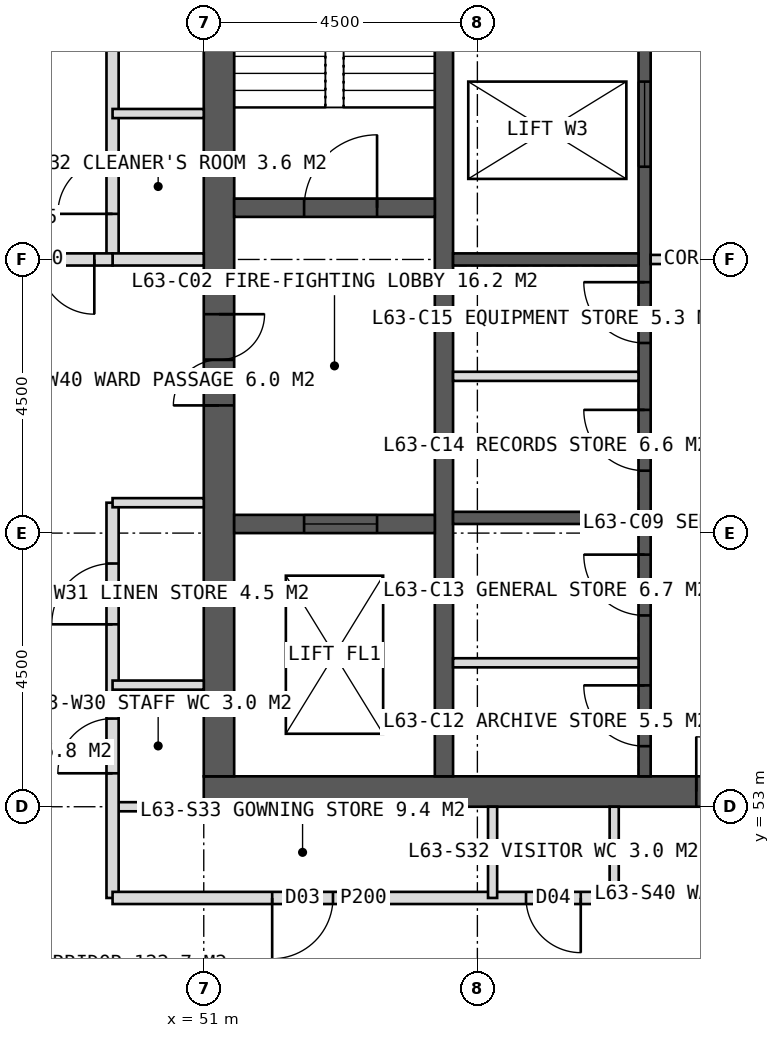
"""IFC4 building model, lengths in metres.
Left out: names, types, materials, properties, quantities, classifications, styles, units other than length and angle.
Written with IfcOpenShell. Run it as: python <this file> out.ifc"""

import sys

from ifc_helpers import new_model, si_unit, direction, frame, frame_2d, origin, place, context, subcontext, project, spatial, rectangle, extrude, element, fill, save


model = new_model("IFC4")
c1 = context("Model", 3, precision=1e-05, world=origin(), true_north=direction((0.0, 1.0)))
c2 = subcontext(c1, "Body", "Model", "MODEL_VIEW")
j1 = project(units=[si_unit("LENGTHUNIT", "METRE"), si_unit("PLANEANGLEUNIT", "RADIAN")], contexts=[c1])
p1 = place(None, origin())
s1 = spatial("IfcSite", under=j1, at=p1, CompositionType="ELEMENT")
p2 = place(p1, origin())
s2 = spatial("IfcBuilding", under=s1, at=p2, CompositionType="ELEMENT")
p3 = place(p2, frame((0.0, 0.0, 262.0)))
s3 = spatial("IfcBuildingStorey", under=s2, at=p3, CompositionType="ELEMENT", Elevation=262.0)
p4 = place(p3, frame((51.0, 53.25, 0.0), z_axis=(0.0, 0.0, 1.0), x_axis=(1.0, 0.0, 0.0)))
e1 = element("IfcWall", 1, at=p4, inside=s3, PredefinedType="SHEAR", context=c2, shape_type="SweptSolid", body=[
    extrude(rectangle(XDim=18.0, YDim=0.5, at=frame_2d((9.0, 0.0))), origin(), (0.0, 0.0, 1.0), 4.0),
])
p5 = place(p4, frame((8.1, 0.0, 0.0)))
e2 = element("IfcOpeningElement", 2, at=p5, cuts=e1, PredefinedType="OPENING", context=c2, shape_type="SweptSolid", body=[
    extrude(rectangle(XDim=1.8, YDim=2.2, at=frame_2d((0.9, 1.1))), frame((0.0, 0.26, 0.0), z_axis=(0.0, -1.0, 0.0), x_axis=(1.0, 0.0, 0.0)), (0.0, 0.0, 1.0), 0.52),
])
p6 = place(p3, frame((51.25, 53.5, 0.0), z_axis=(0.0, 0.0, 1.0), x_axis=(0.0, 1.0, 0.0)))
e3 = element("IfcWall", 3, at=p6, inside=s3, PredefinedType="SHEAR", context=c2, shape_type="SweptSolid", body=[
    extrude(rectangle(XDim=17.0, YDim=0.5, at=frame_2d((8.5, 0.0))), origin(), (0.0, 0.0, 1.0), 4.0),
])
p7 = place(p6, frame((6.1, 0.0, 0.0)))
e4 = element("IfcOpeningElement", 4, at=p7, cuts=e3, PredefinedType="OPENING", context=c2, shape_type="SweptSolid", body=[
    extrude(rectangle(XDim=1.5, YDim=2.2, at=frame_2d((0.75, 1.1))), frame((0.0, 0.26, 0.0), z_axis=(0.0, -1.0, 0.0), x_axis=(1.0, 0.0, 0.0)), (0.0, 0.0, 1.0), 0.52),
])
p8 = place(p3, frame((54.95, 53.5, 0.0), z_axis=(0.0, 0.0, 1.0), x_axis=(0.0, 1.0, 0.0)))
e5 = element("IfcWall", 5, at=p8, inside=s3, PredefinedType="SHEAR", context=c2, shape_type="SweptSolid", body=[
    extrude(rectangle(XDim=17.0, YDim=0.3, at=frame_2d((8.5, 0.0))), origin(), (0.0, 0.0, 1.0), 4.0),
])
p9 = place(p3, frame((58.25, 53.5, 0.0), z_axis=(0.0, 0.0, 1.0), x_axis=(0.0, 1.0, 0.0)))
e6 = element("IfcWall", 6, at=p9, inside=s3, PredefinedType="SHEAR", context=c2, shape_type="SweptSolid", body=[
    extrude(rectangle(XDim=17.0, YDim=0.2, at=frame_2d((8.5, 0.0))), origin(), (0.0, 0.0, 1.0), 4.0),
])
p10 = place(p9, frame((0.496, 0.0, 0.0)))
e7 = element("IfcOpeningElement", 7, at=p10, cuts=e6, PredefinedType="OPENING", context=c2, shape_type="SweptSolid", body=[
    extrude(rectangle(XDim=1.0, YDim=2.1, at=frame_2d((0.5, 1.05))), frame((0.0, 0.11, 0.0), z_axis=(0.0, -1.0, 0.0), x_axis=(1.0, 0.0, 0.0)), (0.0, 0.0, 1.0), 0.22),
])
p11 = place(p9, frame((2.646, 0.0, 0.0)))
e8 = element("IfcOpeningElement", 8, at=p11, cuts=e6, PredefinedType="OPENING", context=c2, shape_type="SweptSolid", body=[
    extrude(rectangle(XDim=1.0, YDim=2.1, at=frame_2d((0.5, 1.05))), frame((0.0, 0.11, 0.0), z_axis=(0.0, -1.0, 0.0), x_axis=(1.0, 0.0, 0.0)), (0.0, 0.0, 1.0), 0.22),
])
p12 = place(p9, frame((5.027, 0.0, 0.0)))
e9 = element("IfcOpeningElement", 9, at=p12, cuts=e6, PredefinedType="OPENING", context=c2, shape_type="SweptSolid", body=[
    extrude(rectangle(XDim=1.0, YDim=2.1, at=frame_2d((0.5, 1.05))), frame((0.0, 0.11, 0.0), z_axis=(0.0, -1.0, 0.0), x_axis=(1.0, 0.0, 0.0)), (0.0, 0.0, 1.0), 0.22),
])
p13 = place(p9, frame((7.126, 0.0, 0.0)))
e10 = element("IfcOpeningElement", 10, at=p13, cuts=e6, PredefinedType="OPENING", context=c2, shape_type="SweptSolid", body=[
    extrude(rectangle(XDim=1.0, YDim=2.1, at=frame_2d((0.5, 1.05))), frame((0.0, 0.11, 0.0), z_axis=(0.0, -1.0, 0.0), x_axis=(1.0, 0.0, 0.0)), (0.0, 0.0, 1.0), 0.22),
])
p14 = place(p9, frame((10.025, 0.0, 0.0)))
e11 = element("IfcOpeningElement", 11, at=p14, cuts=e6, PredefinedType="OPENING", context=c2, shape_type="SweptSolid", body=[
    extrude(rectangle(XDim=1.4, YDim=2.2, at=frame_2d((0.7, 1.1))), frame((0.0, 0.11, 0.0), z_axis=(0.0, -1.0, 0.0), x_axis=(1.0, 0.0, 0.0)), (0.0, 0.0, 1.0), 0.22),
])
p15 = place(p9, frame((14.325, 0.0, 0.0)))
e12 = element("IfcOpeningElement", 12, at=p15, cuts=e6, PredefinedType="OPENING", context=c2, shape_type="SweptSolid", body=[
    extrude(rectangle(XDim=1.4, YDim=2.2, at=frame_2d((0.7, 1.1))), frame((0.0, 0.11, 0.0), z_axis=(0.0, -1.0, 0.0), x_axis=(1.0, 0.0, 0.0)), (0.0, 0.0, 1.0), 0.22),
])
for number, where, z_axis, x_axis in (
    (13, (55.1, 57.75, 0.0), (0.0, 0.0, 1.0), (1.0, 0.0, 0.0)),
    (14, (55.1, 62.0, 0.0), (0.0, 0.0, 1.0), (1.0, 0.0, 0.0)),
):
    element("IfcWall", number, at=place(p3, frame(where, z_axis=z_axis, x_axis=x_axis)), inside=s3, PredefinedType="SHEAR", context=c2, shape_type="SweptSolid", body=[
        extrude(rectangle(XDim=3.05, YDim=0.2, at=frame_2d((1.525, 0.0))), origin(), (0.0, 0.0, 1.0), 4.0),
    ])
p16 = place(p3, frame((51.5, 62.85, 0.0), z_axis=(0.0, 0.0, 1.0), x_axis=(1.0, 0.0, 0.0)))
e15 = element("IfcWall", 15, at=p16, inside=s3, PredefinedType="SHEAR", context=c2, shape_type="SweptSolid", body=[
    extrude(rectangle(XDim=3.3, YDim=0.3, at=frame_2d((1.65, 0.0))), origin(), (0.0, 0.0, 1.0), 4.0),
])
p17 = place(p16, frame((1.15, 0.0, 0.0)))
e16 = element("IfcOpeningElement", 16, at=p17, cuts=e15, PredefinedType="OPENING", context=c2, shape_type="SweptSolid", body=[
    extrude(rectangle(XDim=1.2, YDim=2.1, at=frame_2d((0.6, 1.05))), frame((0.0, 0.16, 0.0), z_axis=(0.0, -1.0, 0.0), x_axis=(1.0, 0.0, 0.0)), (0.0, 0.0, 1.0), 0.32),
])
p18 = place(p3, frame((51.5, 57.65, 0.0), z_axis=(0.0, 0.0, 1.0), x_axis=(1.0, 0.0, 0.0)))
e17 = element("IfcWall", 17, at=p18, inside=s3, PredefinedType="SHEAR", context=c2, shape_type="SweptSolid", body=[
    extrude(rectangle(XDim=3.3, YDim=0.3, at=frame_2d((1.65, 0.0))), origin(), (0.0, 0.0, 1.0), 4.0),
])
p19 = place(p18, frame((1.15, 0.0, 0.0)))
e18 = element("IfcOpeningElement", 18, at=p19, cuts=e17, PredefinedType="OPENING", context=c2, shape_type="SweptSolid", body=[
    extrude(rectangle(XDim=1.2, YDim=2.2, at=frame_2d((0.6, 1.1))), frame((0.0, 0.16, 0.0), z_axis=(0.0, -1.0, 0.0), x_axis=(1.0, 0.0, 0.0)), (0.0, 0.0, 1.0), 0.32),
])
p20 = place(p3, frame((51.0, 53.0, 0.0), z_axis=(0.0, 0.0, 1.0), x_axis=(-1.0, 0.0, 0.0)))
e19 = element("IfcWall", 19, at=p20, inside=s3, PredefinedType="PARTITIONING", context=c2, shape_type="SweptSolid", body=[
    extrude(rectangle(XDim=1.5, YDim=0.15, at=frame_2d((0.75, 0.0))), origin(), (0.0, 0.0, 1.0), 3.75),
])
p21 = place(p3, frame((49.5, 51.5, 0.0), z_axis=(0.0, 0.0, 1.0), x_axis=(0.0, 1.0, 0.0)))
e20 = element("IfcWall", 20, at=p21, inside=s3, PredefinedType="PARTITIONING", context=c2, shape_type="SweptSolid", body=[
    extrude(rectangle(XDim=6.5, YDim=0.2, at=frame_2d((3.25, 0.0))), origin(), (0.0, 0.0, 1.0), 3.75),
])
p22 = place(p21, frame((2.05, 0.0, 0.0)))
e21 = element("IfcOpeningElement", 21, at=p22, cuts=e20, PredefinedType="OPENING", context=c2, shape_type="SweptSolid", body=[
    extrude(rectangle(XDim=0.9, YDim=2.1, at=frame_2d((0.45, 1.05))), frame((0.0, 0.11, 0.0), z_axis=(0.0, -1.0, 0.0), x_axis=(1.0, 0.0, 0.0)), (0.0, 0.0, 1.0), 0.22),
])
p23 = place(p21, frame((4.5, 0.0, 0.0)))
e22 = element("IfcOpeningElement", 22, at=p23, cuts=e20, PredefinedType="OPENING", context=c2, shape_type="SweptSolid", body=[
    extrude(rectangle(XDim=1.0, YDim=2.1, at=frame_2d((0.5, 1.05))), frame((0.0, 0.11, 0.0), z_axis=(0.0, -1.0, 0.0), x_axis=(1.0, 0.0, 0.0)), (0.0, 0.0, 1.0), 0.22),
])
p24 = place(p3, frame((49.5, 62.0, 0.0), z_axis=(0.0, 0.0, 1.0), x_axis=(0.0, 1.0, 0.0)))
e23 = element("IfcWall", 23, at=p24, inside=s3, PredefinedType="PARTITIONING", context=c2, shape_type="SweptSolid", body=[
    extrude(rectangle(XDim=10.5, YDim=0.2, at=frame_2d((5.25, 0.0))), origin(), (0.0, 0.0, 1.0), 3.75),
])
p25 = place(p24, frame((0.75, 0.0, 0.0)))
e24 = element("IfcOpeningElement", 24, at=p25, cuts=e23, PredefinedType="OPENING", context=c2, shape_type="SweptSolid", body=[
    extrude(rectangle(XDim=0.9, YDim=2.1, at=frame_2d((0.45, 1.05))), frame((0.0, 0.11, 0.0), z_axis=(0.0, -1.0, 0.0), x_axis=(1.0, 0.0, 0.0)), (0.0, 0.0, 1.0), 0.22),
])
p26 = place(p24, frame((5.95, 0.0, 0.0)))
e25 = element("IfcOpeningElement", 25, at=p26, cuts=e23, PredefinedType="OPENING", context=c2, shape_type="SweptSolid", body=[
    extrude(rectangle(XDim=1.0, YDim=2.1, at=frame_2d((0.5, 1.05))), frame((0.0, 0.11, 0.0), z_axis=(0.0, -1.0, 0.0), x_axis=(1.0, 0.0, 0.0)), (0.0, 0.0, 1.0), 0.22),
])
p27 = place(p3, frame((51.0, 58.0, 0.0), z_axis=(0.0, 0.0, 1.0), x_axis=(-1.0, 0.0, 0.0)))
e26 = element("IfcWall", 26, at=p27, inside=s3, PredefinedType="PARTITIONING", context=c2, shape_type="SweptSolid", body=[
    extrude(rectangle(XDim=1.5, YDim=0.15, at=frame_2d((0.75, 0.0))), origin(), (0.0, 0.0, 1.0), 3.75),
])
p28 = place(p3, frame((51.0, 62.0, 0.0), z_axis=(0.0, 0.0, 1.0), x_axis=(-1.0, 0.0, 0.0)))
e27 = element("IfcWall", 27, at=p28, inside=s3, PredefinedType="SOLIDWALL", context=c2, shape_type="SweptSolid", body=[
    extrude(rectangle(XDim=1.5, YDim=0.2, at=frame_2d((0.75, 0.0))), origin(), (0.0, 0.0, 1.0), 2.75),
])
for number, where, z_axis, x_axis in (
    (28, (51.0, 55.0, 0.0), (0.0, 0.0, 1.0), (-1.0, 0.0, 0.0)),
    (29, (51.0, 64.4, 0.0), (0.0, 0.0, 1.0), (-1.0, 0.0, 0.0)),
):
    element("IfcWall", number, at=place(p3, frame(where, z_axis=z_axis, x_axis=x_axis)), inside=s3, PredefinedType="PARTITIONING", context=c2, shape_type="SweptSolid", body=[
        extrude(rectangle(XDim=1.5, YDim=0.15, at=frame_2d((0.75, 0.0))), origin(), (0.0, 0.0, 1.0), 3.75),
    ])
p29 = place(p3, frame((57.75, 51.5, 0.0), z_axis=(0.0, 0.0, 1.0), x_axis=(-1.0, 0.0, 0.0)))
e30 = element("IfcWall", 30, at=p29, inside=s3, PredefinedType="PARTITIONING", context=c2, shape_type="SweptSolid", body=[
    extrude(rectangle(XDim=8.25, YDim=0.2, at=frame_2d((4.125, 0.0))), origin(), (0.0, 0.0, 1.0), 3.75),
])
p30 = place(p29, frame((0.55, 0.0, 0.0)))
e31 = element("IfcOpeningElement", 31, at=p30, cuts=e30, PredefinedType="OPENING", context=c2, shape_type="SweptSolid", body=[
    extrude(rectangle(XDim=0.9, YDim=2.1, at=frame_2d((0.45, 1.05))), frame((0.0, 0.11, 0.0), z_axis=(0.0, -1.0, 0.0), x_axis=(1.0, 0.0, 0.0)), (0.0, 0.0, 1.0), 0.22),
])
p31 = place(p29, frame((4.625, 0.0, 0.0)))
e32 = element("IfcOpeningElement", 32, at=p31, cuts=e30, PredefinedType="OPENING", context=c2, shape_type="SweptSolid", body=[
    extrude(rectangle(XDim=1.0, YDim=2.1, at=frame_2d((0.5, 1.05))), frame((0.0, 0.11, 0.0), z_axis=(0.0, -1.0, 0.0), x_axis=(1.0, 0.0, 0.0)), (0.0, 0.0, 1.0), 0.22),
])
p32 = place(p3, frame((57.75, 53.0, 0.0), z_axis=(0.0, 0.0, 1.0), x_axis=(0.0, -1.0, 0.0)))
e33 = element("IfcWall", 33, at=p32, inside=s3, PredefinedType="PARTITIONING", context=c2, shape_type="SweptSolid", body=[
    extrude(rectangle(XDim=1.5, YDim=0.15, at=frame_2d((0.75, 0.0))), origin(), (0.0, 0.0, 1.0), 3.75),
])
p33 = place(p3, frame((55.75, 53.0, 0.0), z_axis=(0.0, 0.0, 1.0), x_axis=(0.0, -1.0, 0.0)))
e34 = element("IfcWall", 34, at=p33, inside=s3, PredefinedType="PARTITIONING", context=c2, shape_type="SweptSolid", body=[
    extrude(rectangle(XDim=1.5, YDim=0.15, at=frame_2d((0.75, 0.0))), origin(), (0.0, 0.0, 1.0), 2.95),
])
p34 = place(p3, frame((49.5, 62.0, 0.0), z_axis=(0.0, 0.0, 1.0), x_axis=(-1.0, 0.0, 0.0)))
e35 = element("IfcWall", 35, at=p34, inside=s3, PredefinedType="SOLIDWALL", context=c2, shape_type="SweptSolid", body=[
    extrude(rectangle(XDim=2.6, YDim=0.2, at=frame_2d((1.3, 0.0))), origin(), (0.0, 0.0, 1.0), 2.75),
])
p35 = place(p34, frame((0.3, 0.0, 0.0)))
e36 = element("IfcOpeningElement", 36, at=p35, cuts=e35, PredefinedType="OPENING", context=c2, shape_type="SweptSolid", body=[
    extrude(rectangle(XDim=1.8, YDim=2.2, at=frame_2d((0.9, 1.1))), frame((0.0, 0.11, 0.0), z_axis=(0.0, -1.0, 0.0), x_axis=(1.0, 0.0, 0.0)), (0.0, 0.0, 1.0), 0.22),
])
for number, where, z_axis, x_axis in (
    (37, (55.1, 55.367, 0.0), (0.0, 0.0, 1.0), (1.0, 0.0, 0.0)),
    (38, (55.1, 60.078, 0.0), (0.0, 0.0, 1.0), (1.0, 0.0, 0.0)),
):
    element("IfcWall", number, at=place(p3, frame(where, z_axis=z_axis, x_axis=x_axis)), inside=s3, PredefinedType="PARTITIONING", context=c2, shape_type="SweptSolid", body=[
        extrude(rectangle(XDim=3.05, YDim=0.15, at=frame_2d((1.525, 0.0))), origin(), (0.0, 0.0, 1.0), 3.75),
    ])
p36 = place(p3, frame((58.35, 62.0, 0.0), z_axis=(0.0, 0.0, 1.0), x_axis=(1.0, 0.0, 0.0)))
e39 = element("IfcWall", 39, at=p36, inside=s3, PredefinedType="PARTITIONING", context=c2, shape_type="SweptSolid", body=[
    extrude(rectangle(XDim=3.3, YDim=0.15, at=frame_2d((1.65, 0.0))), origin(), (0.0, 0.0, 1.0), 3.75),
])
p37 = place(p22, origin())
e40 = element("IfcDoor", 40, at=p37, inside=s3, OperationType="SINGLE_SWING_LEFT", PredefinedType="DOOR", context=c2, shape_type="SweptSolid", body=[
    extrude(rectangle(XDim=0.9, YDim=2.1, at=frame_2d((0.45, 1.05))), frame((0.0, 0.025, 0.0), z_axis=(0.0, -1.0, 0.0), x_axis=(1.0, 0.0, 0.0)), (0.0, 0.0, 1.0), 0.05),
])
fill(e21, e40)
p38 = place(p23, origin())
e41 = element("IfcDoor", 41, at=p38, inside=s3, OperationType="SINGLE_SWING_LEFT", PredefinedType="DOOR", context=c2, shape_type="SweptSolid", body=[
    extrude(rectangle(XDim=1.0, YDim=2.1, at=frame_2d((0.5, 1.05))), frame((0.0, 0.025, 0.0), z_axis=(0.0, -1.0, 0.0), x_axis=(1.0, 0.0, 0.0)), (0.0, 0.0, 1.0), 0.05),
])
fill(e22, e41)
p39 = place(p25, origin())
e42 = element("IfcDoor", 42, at=p39, inside=s3, OperationType="SINGLE_SWING_LEFT", PredefinedType="DOOR", context=c2, shape_type="SweptSolid", body=[
    extrude(rectangle(XDim=0.9, YDim=2.1, at=frame_2d((0.45, 1.05))), frame((0.0, 0.025, 0.0), z_axis=(0.0, -1.0, 0.0), x_axis=(1.0, 0.0, 0.0)), (0.0, 0.0, 1.0), 0.05),
])
fill(e24, e42)
p40 = place(p30, origin())
e43 = element("IfcDoor", 43, at=p40, inside=s3, OperationType="SINGLE_SWING_LEFT", PredefinedType="DOOR", context=c2, shape_type="SweptSolid", body=[
    extrude(rectangle(XDim=0.9, YDim=2.1, at=frame_2d((0.45, 1.05))), frame((0.0, 0.025, 0.0), z_axis=(0.0, -1.0, 0.0), x_axis=(1.0, 0.0, 0.0)), (0.0, 0.0, 1.0), 0.05),
])
fill(e31, e43)
p41 = place(p31, origin())
e44 = element("IfcDoor", 44, at=p41, inside=s3, OperationType="SINGLE_SWING_RIGHT", PredefinedType="DOOR", context=c2, shape_type="SweptSolid", body=[
    extrude(rectangle(XDim=1.0, YDim=2.1, at=frame_2d((0.5, 1.05))), frame((0.0, 0.025, 0.0), z_axis=(0.0, -1.0, 0.0), x_axis=(1.0, 0.0, 0.0)), (0.0, 0.0, 1.0), 0.05),
])
fill(e32, e44)
p42 = place(p35, origin())
e45 = element("IfcDoor", 45, at=p42, inside=s3, OperationType="DOUBLE_DOOR_DOUBLE_SWING", PredefinedType="DOOR", context=c2, shape_type="SweptSolid", body=[
    extrude(rectangle(XDim=1.8, YDim=2.2, at=frame_2d((0.9, 1.1))), frame((0.0, 0.025, 0.0), z_axis=(0.0, -1.0, 0.0), x_axis=(1.0, 0.0, 0.0)), (0.0, 0.0, 1.0), 0.05),
])
fill(e36, e45)
p43 = place(p7, origin())
e46 = element("IfcDoor", 46, at=p43, inside=s3, OperationType="DOUBLE_DOOR_SINGLE_SWING", PredefinedType="DOOR", context=c2, shape_type="SweptSolid", body=[
    extrude(rectangle(XDim=1.5, YDim=2.2, at=frame_2d((0.75, 1.1))), frame((0.0, 0.025, 0.0), z_axis=(0.0, -1.0, 0.0), x_axis=(1.0, 0.0, 0.0)), (0.0, 0.0, 1.0), 0.05),
])
fill(e4, e46)
p44 = place(p17, origin())
e47 = element("IfcDoor", 47, at=p44, inside=s3, OperationType="SINGLE_SWING_RIGHT", PredefinedType="DOOR", context=c2, shape_type="SweptSolid", body=[
    extrude(rectangle(XDim=1.2, YDim=2.1, at=frame_2d((0.6, 1.05))), frame((0.0, 0.025, 0.0), z_axis=(0.0, -1.0, 0.0), x_axis=(1.0, 0.0, 0.0)), (0.0, 0.0, 1.0), 0.05),
])
fill(e16, e47)
p45 = place(p19, origin())
e48 = element("IfcDoor", 48, at=p45, inside=s3, OperationType="SLIDING_TO_LEFT", PredefinedType="DOOR", context=c2, shape_type="SweptSolid", body=[
    extrude(rectangle(XDim=1.2, YDim=2.2, at=frame_2d((0.6, 1.1))), frame((0.0, 0.025, 0.0), z_axis=(0.0, -1.0, 0.0), x_axis=(1.0, 0.0, 0.0)), (0.0, 0.0, 1.0), 0.05),
])
fill(e18, e48)
p46 = place(p10, origin())
e49 = element("IfcDoor", 49, at=p46, inside=s3, OperationType="SINGLE_SWING_RIGHT", PredefinedType="DOOR", context=c2, shape_type="SweptSolid", body=[
    extrude(rectangle(XDim=1.0, YDim=2.1, at=frame_2d((0.5, 1.05))), frame((0.0, 0.025, 0.0), z_axis=(0.0, -1.0, 0.0), x_axis=(1.0, 0.0, 0.0)), (0.0, 0.0, 1.0), 0.05),
])
fill(e7, e49)
p47 = place(p11, origin())
e50 = element("IfcDoor", 50, at=p47, inside=s3, OperationType="SINGLE_SWING_RIGHT", PredefinedType="DOOR", context=c2, shape_type="SweptSolid", body=[
    extrude(rectangle(XDim=1.0, YDim=2.1, at=frame_2d((0.5, 1.05))), frame((0.0, 0.025, 0.0), z_axis=(0.0, -1.0, 0.0), x_axis=(1.0, 0.0, 0.0)), (0.0, 0.0, 1.0), 0.05),
])
fill(e8, e50)
p48 = place(p12, origin())
e51 = element("IfcDoor", 51, at=p48, inside=s3, OperationType="SINGLE_SWING_RIGHT", PredefinedType="DOOR", context=c2, shape_type="SweptSolid", body=[
    extrude(rectangle(XDim=1.0, YDim=2.1, at=frame_2d((0.5, 1.05))), frame((0.0, 0.025, 0.0), z_axis=(0.0, -1.0, 0.0), x_axis=(1.0, 0.0, 0.0)), (0.0, 0.0, 1.0), 0.05),
])
fill(e9, e51)
p49 = place(p13, origin())
e52 = element("IfcDoor", 52, at=p49, inside=s3, OperationType="SINGLE_SWING_RIGHT", PredefinedType="DOOR", context=c2, shape_type="SweptSolid", body=[
    extrude(rectangle(XDim=1.0, YDim=2.1, at=frame_2d((0.5, 1.05))), frame((0.0, 0.025, 0.0), z_axis=(0.0, -1.0, 0.0), x_axis=(1.0, 0.0, 0.0)), (0.0, 0.0, 1.0), 0.05),
])
fill(e10, e52)
p50 = place(p14, origin())
e53 = element("IfcDoor", 53, at=p50, inside=s3, OperationType="SLIDING_TO_LEFT", PredefinedType="DOOR", context=c2, shape_type="SweptSolid", body=[
    extrude(rectangle(XDim=1.4, YDim=2.2, at=frame_2d((0.7, 1.1))), frame((0.0, 0.025, 0.0), z_axis=(0.0, -1.0, 0.0), x_axis=(1.0, 0.0, 0.0)), (0.0, 0.0, 1.0), 0.05),
])
fill(e11, e53)
p51 = place(p5, origin())
e54 = element("IfcDoor", 54, at=p51, inside=s3, OperationType="DOUBLE_DOOR_SINGLE_SWING", PredefinedType="DOOR", context=c2, shape_type="SweptSolid", body=[
    extrude(rectangle(XDim=1.8, YDim=2.2, at=frame_2d((0.9, 1.1))), frame((0.0, 0.025, 0.0), z_axis=(0.0, -1.0, 0.0), x_axis=(1.0, 0.0, 0.0)), (0.0, 0.0, 1.0), 0.05),
])
fill(e2, e54)
save(model, sys.argv[1])
